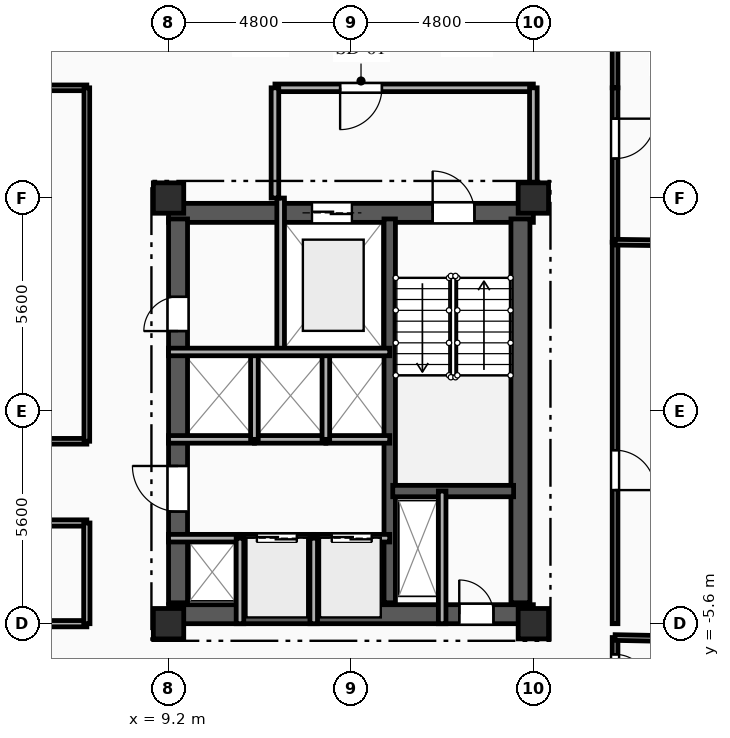
"""IFC4 building model, lengths in metres.
Left out: names, types, materials, properties, quantities, classifications, styles, units other than length and angle.
Written with IfcOpenShell. Run it as: python <this file> out.ifc"""

import sys

from ifc_helpers import new_model, si_unit, direction, frame, frame_2d, origin, origin_2d, place, context, subcontext, project, spatial, rectangle, extrude, element, fill, save


model = new_model("IFC4")
c1 = context("Model", 3, precision=1e-05, world=origin(), true_north=direction((0.0, 1.0)))
c2 = subcontext(c1, "Body", "Model", "MODEL_VIEW")
j1 = project(units=[si_unit("LENGTHUNIT", "METRE"), si_unit("PLANEANGLEUNIT", "RADIAN")], contexts=[c1])
p1 = place(None, origin())
s1 = spatial("IfcSite", under=j1, at=p1, CompositionType="ELEMENT")
p2 = place(p1, origin())
s2 = spatial("IfcBuilding", under=s1, at=p2, CompositionType="ELEMENT")
p3 = place(p2, frame((0.0, 0.0, 206.45)))
s3 = spatial("IfcBuildingStorey", under=s2, at=p3, CompositionType="ELEMENT", Elevation=206.45)
for number, where, z_axis, x_axis in (
    (1, (9.2, -5.6, 0.0), (0.0, 0.0, 1.0), (1.0, 0.0, 0.0)),
    (2, (9.2, 5.6, 0.0), (0.0, 0.0, 1.0), (1.0, 0.0, 0.0)),
    (3, (18.8, -5.6, 0.0), (0.0, 0.0, 1.0), (1.0, 0.0, 0.0)),
    (4, (18.8, 5.6, 0.0), (0.0, 0.0, 1.0), (1.0, 0.0, 0.0)),
):
    element("IfcColumn", number, at=place(p3, frame(where, z_axis=z_axis, x_axis=x_axis)), inside=s3, PredefinedType="COLUMN", context=c2, shape_type="SweptSolid", body=[
        extrude(rectangle(XDim=0.8, YDim=0.8, at=origin_2d()), origin(), (0.0, 0.0, 1.0), 3.35),
    ])
p4 = place(p3, frame((9.2, 5.21, 0.0), z_axis=(0.0, 0.0, 1.0), x_axis=(1.0, 0.0, 0.0)))
e5 = element("IfcWall", 5, at=p4, inside=s3, PredefinedType="SHEAR", context=c2, shape_type="SweptSolid", body=[
    extrude(rectangle(XDim=9.6, YDim=0.5, at=frame_2d((4.8, 0.0))), origin(), (0.0, 0.0, 1.0), 3.04),
])
p5 = place(p4, frame((6.95, 0.0, 0.0)))
e6 = element("IfcOpeningElement", 6, at=p5, cuts=e5, PredefinedType="OPENING", context=c2, shape_type="SweptSolid", body=[
    extrude(rectangle(XDim=1.1, YDim=2.15, at=frame_2d((0.55, 1.075))), frame((0.0, 0.26, 0.0), z_axis=(0.0, -1.0, 0.0), x_axis=(1.0, 0.0, 0.0)), (0.0, 0.0, 1.0), 0.52),
])
p6 = place(p4, frame((3.775, 0.0, 0.0)))
e7 = element("IfcOpeningElement", 7, at=p6, cuts=e5, PredefinedType="OPENING", context=c2, shape_type="SweptSolid", body=[
    extrude(rectangle(XDim=1.05, YDim=2.1, at=frame_2d((0.525, 1.05))), frame((0.0, 0.26, 0.0), z_axis=(0.0, -1.0, 0.0), x_axis=(1.0, 0.0, 0.0)), (0.0, 0.0, 1.0), 0.52),
])
p7 = place(p3, frame((9.2, -5.35, 0.0), z_axis=(0.0, 0.0, 1.0), x_axis=(1.0, 0.0, 0.0)))
e8 = element("IfcWall", 8, at=p7, inside=s3, PredefinedType="SHEAR", context=c2, shape_type="SweptSolid", body=[
    extrude(rectangle(XDim=9.6, YDim=0.5, at=frame_2d((4.8, 0.0))), origin(), (0.0, 0.0, 1.0), 3.04),
])
p8 = place(p7, frame((7.65, 0.0, 0.0)))
e9 = element("IfcOpeningElement", 9, at=p8, cuts=e8, PredefinedType="OPENING", context=c2, shape_type="SweptSolid", body=[
    extrude(rectangle(XDim=0.9, YDim=2.1, at=frame_2d((0.45, 1.05))), frame((0.0, 0.26, 0.0), z_axis=(0.0, -1.0, 0.0), x_axis=(1.0, 0.0, 0.0)), (0.0, 0.0, 1.0), 0.52),
])
p9 = place(p3, frame((9.45, -5.05, 0.0), z_axis=(0.0, 0.0, 1.0), x_axis=(0.0, 1.0, 0.0)))
e10 = element("IfcWall", 10, at=p9, inside=s3, PredefinedType="SHEAR", context=c2, shape_type="SweptSolid", body=[
    extrude(rectangle(XDim=10.1, YDim=0.5, at=frame_2d((5.05, 0.0))), origin(), (0.0, 0.0, 1.0), 3.04),
])
p10 = place(p9, frame((7.15, 0.0, 0.0)))
e11 = element("IfcOpeningElement", 11, at=p10, cuts=e10, PredefinedType="OPENING", context=c2, shape_type="SweptSolid", body=[
    extrude(rectangle(XDim=0.9, YDim=2.1, at=frame_2d((0.45, 1.05))), frame((0.0, 0.26, 0.0), z_axis=(0.0, -1.0, 0.0), x_axis=(1.0, 0.0, 0.0)), (0.0, 0.0, 1.0), 0.52),
])
p11 = place(p9, frame((2.4, 0.0, 0.0)))
e12 = element("IfcOpeningElement", 12, at=p11, cuts=e10, PredefinedType="OPENING", context=c2, shape_type="SweptSolid", body=[
    extrude(rectangle(XDim=1.2, YDim=2.15, at=frame_2d((0.6, 1.075))), frame((0.0, 0.26, 0.0), z_axis=(0.0, -1.0, 0.0), x_axis=(1.0, 0.0, 0.0)), (0.0, 0.0, 1.0), 0.52),
])
p12 = place(p3, frame((18.46, -5.05, 0.0), z_axis=(0.0, 0.0, 1.0), x_axis=(0.0, 1.0, 0.0)))
e13 = element("IfcWall", 13, at=p12, inside=s3, PredefinedType="SHEAR", context=c2, shape_type="SweptSolid", body=[
    extrude(rectangle(XDim=10.1, YDim=0.5, at=frame_2d((5.05, 0.0))), origin(), (0.0, 0.0, 1.0), 3.04),
])
p13 = place(p3, frame((15.02, -5.05, 0.0), z_axis=(0.0, 0.0, 1.0), x_axis=(0.0, 1.0, 0.0)))
e14 = element("IfcWall", 14, at=p13, inside=s3, PredefinedType="SHEAR", context=c2, shape_type="SweptSolid", body=[
    extrude(rectangle(XDim=10.1, YDim=0.3, at=frame_2d((5.05, 0.0))), origin(), (0.0, 0.0, 1.0), 3.04),
])
p14 = place(p3, frame((15.1, -2.11, 0.0), z_axis=(0.0, 0.0, 1.0), x_axis=(1.0, 0.0, 0.0)))
e15 = element("IfcWall", 15, at=p14, inside=s3, PredefinedType="SHEAR", context=c2, shape_type="SweptSolid", body=[
    extrude(rectangle(XDim=3.18, YDim=0.3, at=frame_2d((1.59, 0.0))), origin(), (0.0, 0.0, 1.0), 3.04),
])
p15 = place(p3, frame((16.4, -2.11, 0.0), z_axis=(0.0, 0.0, 1.0), x_axis=(0.0, -1.0, 0.0)))
e16 = element("IfcWall", 16, at=p15, inside=s3, PredefinedType="PARTITIONING", context=c2, shape_type="SweptSolid", body=[
    extrude(rectangle(XDim=3.49, YDim=0.2, at=frame_2d((1.745, 0.0))), origin(), (0.0, 0.0, 1.0), 3.04),
])
p16 = place(p3, frame((12.15, 5.6, 0.0), z_axis=(0.0, 0.0, 1.0), x_axis=(0.0, -1.0, 0.0)))
e17 = element("IfcWall", 17, at=p16, inside=s3, PredefinedType="PARTITIONING", context=c2, shape_type="SweptSolid", body=[
    extrude(rectangle(XDim=4.05, YDim=0.2, at=frame_2d((2.025, 0.0))), origin(), (0.0, 0.0, 1.0), 3.04),
])
p17 = place(p3, frame((18.8, 8.5, 0.0), z_axis=(0.0, 0.0, 1.0), x_axis=(-1.0, 0.0, 0.0)))
e18 = element("IfcWall", 18, at=p17, inside=s3, PredefinedType="PARTITIONING", context=c2, shape_type="SweptSolid", body=[
    extrude(rectangle(XDim=6.8, YDim=0.2, at=frame_2d((3.4, 0.0))), origin(), (0.0, 0.0, 1.0), 3.04),
])
p18 = place(p17, frame((3.985, 0.0, 0.0)))
e19 = element("IfcOpeningElement", 19, at=p18, cuts=e18, PredefinedType="OPENING", context=c2, shape_type="SweptSolid", body=[
    extrude(rectangle(XDim=1.1, YDim=2.15, at=frame_2d((0.55, 1.075))), frame((0.0, 0.11, 0.0), z_axis=(0.0, -1.0, 0.0), x_axis=(1.0, 0.0, 0.0)), (0.0, 0.0, 1.0), 0.22),
])
p19 = place(p3, frame((18.8, 5.6, 0.0), z_axis=(0.0, 0.0, 1.0), x_axis=(0.0, 1.0, 0.0)))
e20 = element("IfcWall", 20, at=p19, inside=s3, PredefinedType="PARTITIONING", context=c2, shape_type="SweptSolid", body=[
    extrude(rectangle(XDim=2.9, YDim=0.2, at=frame_2d((1.45, 0.0))), origin(), (0.0, 0.0, 1.0), 2.665),
])
p20 = place(p3, frame((12.0, 8.5, 0.0), z_axis=(0.0, 0.0, 1.0), x_axis=(0.0, -1.0, 0.0)))
e21 = element("IfcWall", 21, at=p20, inside=s3, PredefinedType="PARTITIONING", context=c2, shape_type="SweptSolid", body=[
    extrude(rectangle(XDim=2.9, YDim=0.2, at=frame_2d((1.45, 0.0))), origin(), (0.0, 0.0, 1.0), 3.04),
])
p21 = place(p3, frame((9.2, -3.35, 0.0), z_axis=(0.0, 0.0, 1.0), x_axis=(1.0, 0.0, 0.0)))
e22 = element("IfcWall", 22, at=p21, inside=s3, PredefinedType="PARTITIONING", context=c2, shape_type="SweptSolid", body=[
    extrude(rectangle(XDim=1.88, YDim=0.2, at=frame_2d((0.94, 0.0))), origin(), (0.0, 0.0, 1.0), 2.755),
])
p22 = place(p3, frame((11.08, -3.35, 0.0), z_axis=(0.0, 0.0, 1.0), x_axis=(1.0, 0.0, 0.0)))
e23 = element("IfcWall", 23, at=p22, inside=s3, PredefinedType="PARTITIONING", context=c2, shape_type="SweptSolid", body=[
    extrude(rectangle(XDim=1.94, YDim=0.2, at=frame_2d((0.97, 0.0))), origin(), (0.0, 0.0, 1.0), 3.04),
])
p23 = place(p22, frame((0.445, 0.0, 0.0)))
e24 = element("IfcOpeningElement", 24, at=p23, cuts=e23, PredefinedType="OPENING", context=c2, shape_type="SweptSolid", body=[
    extrude(rectangle(XDim=1.05, YDim=2.1, at=frame_2d((0.525, 1.05))), frame((0.0, 0.11, 0.0), z_axis=(0.0, -1.0, 0.0), x_axis=(1.0, 0.0, 0.0)), (0.0, 0.0, 1.0), 0.22),
])
p24 = place(p3, frame((13.02, -3.35, 0.0), z_axis=(0.0, 0.0, 1.0), x_axis=(1.0, 0.0, 0.0)))
e25 = element("IfcWall", 25, at=p24, inside=s3, PredefinedType="PARTITIONING", context=c2, shape_type="SweptSolid", body=[
    extrude(rectangle(XDim=2.0, YDim=0.2, at=frame_2d((1.0, 0.0))), origin(), (0.0, 0.0, 1.0), 3.04),
])
p25 = place(p24, frame((0.475, 0.0, 0.0)))
e26 = element("IfcOpeningElement", 26, at=p25, cuts=e25, PredefinedType="OPENING", context=c2, shape_type="SweptSolid", body=[
    extrude(rectangle(XDim=1.05, YDim=2.1, at=frame_2d((0.525, 1.05))), frame((0.0, 0.11, 0.0), z_axis=(0.0, -1.0, 0.0), x_axis=(1.0, 0.0, 0.0)), (0.0, 0.0, 1.0), 0.22),
])
p26 = place(p3, frame((11.46, -0.75, 0.0), z_axis=(0.0, 0.0, 1.0), x_axis=(-1.0, 0.0, 0.0)))
e27 = element("IfcWall", 27, at=p26, inside=s3, PredefinedType="PARTITIONING", context=c2, shape_type="SweptSolid", body=[
    extrude(rectangle(XDim=2.26, YDim=0.2, at=frame_2d((1.13, 0.0))), origin(), (0.0, 0.0, 1.0), 3.04),
])
p27 = place(p3, frame((13.34, -0.75, 0.0), z_axis=(0.0, 0.0, 1.0), x_axis=(-1.0, 0.0, 0.0)))
e28 = element("IfcWall", 28, at=p27, inside=s3, PredefinedType="PARTITIONING", context=c2, shape_type="SweptSolid", body=[
    extrude(rectangle(XDim=1.88, YDim=0.2, at=frame_2d((0.94, 0.0))), origin(), (0.0, 0.0, 1.0), 3.04),
])
p28 = place(p3, frame((15.02, -0.75, 0.0), z_axis=(0.0, 0.0, 1.0), x_axis=(-1.0, 0.0, 0.0)))
e29 = element("IfcWall", 29, at=p28, inside=s3, PredefinedType="PARTITIONING", context=c2, shape_type="SweptSolid", body=[
    extrude(rectangle(XDim=1.68, YDim=0.2, at=frame_2d((0.84, 0.0))), origin(), (0.0, 0.0, 1.0), 3.04),
])
for number, where, z_axis, x_axis in (
    (30, (11.08, -5.6, 0.0), (0.0, 0.0, 1.0), (0.0, 1.0, 0.0)),
    (31, (13.02, -5.6, 0.0), (0.0, 0.0, 1.0), (0.0, 1.0, 0.0)),
):
    element("IfcWall", number, at=place(p3, frame(where, z_axis=z_axis, x_axis=x_axis)), inside=s3, PredefinedType="PARTITIONING", context=c2, shape_type="SweptSolid", body=[
        extrude(rectangle(XDim=2.25, YDim=0.2, at=frame_2d((1.125, 0.0))), origin(), (0.0, 0.0, 1.0), 3.04),
    ])
for number, where, z_axis, x_axis in (
    (32, (11.46, -0.75, 0.0), (0.0, 0.0, 1.0), (0.0, 1.0, 0.0)),
    (33, (13.34, -0.75, 0.0), (0.0, 0.0, 1.0), (0.0, 1.0, 0.0)),
):
    element("IfcWall", number, at=place(p3, frame(where, z_axis=z_axis, x_axis=x_axis)), inside=s3, PredefinedType="PARTITIONING", context=c2, shape_type="SweptSolid", body=[
        extrude(rectangle(XDim=2.3, YDim=0.2, at=frame_2d((1.15, 0.0))), origin(), (0.0, 0.0, 1.0), 3.04),
    ])
p29 = place(p3, frame((20.95, 10.65, 0.0), z_axis=(0.0, 0.0, 1.0), x_axis=(0.0, -1.0, 0.0)))
e34 = element("IfcWall", 34, at=p29, inside=s3, PredefinedType="PARTITIONING", context=c2, shape_type="SweptSolid", body=[
    extrude(rectangle(XDim=2.15, YDim=0.15, at=frame_2d((1.075, 0.0))), origin(), (0.0, 0.0, 1.0), 3.04),
])
p30 = place(p3, frame((7.05, 8.5, 0.0), z_axis=(0.0, 0.0, 1.0), x_axis=(-1.0, 0.0, 0.0)))
e35 = element("IfcWall", 35, at=p30, inside=s3, PredefinedType="PARTITIONING", context=c2, shape_type="SweptSolid", body=[
    extrude(rectangle(XDim=7.05, YDim=0.15, at=frame_2d((3.525, 0.0))), origin(), (0.0, 0.0, 1.0), 3.04),
])
p31 = place(p3, frame((20.95, -5.964, 0.0), z_axis=(0.0, 0.0, 1.0), x_axis=(0.0, -1.0, 0.0)))
e36 = element("IfcWall", 36, at=p31, inside=s3, PredefinedType="PARTITIONING", context=c2, shape_type="SweptSolid", body=[
    extrude(rectangle(XDim=1.786, YDim=0.15, at=frame_2d((0.893, 0.0))), origin(), (0.0, 0.0, 1.0), 3.04),
])
p32 = place(p31, frame((0.443, 0.0, 0.0)))
e37 = element("IfcOpeningElement", 37, at=p32, cuts=e36, PredefinedType="OPENING", context=c2, shape_type="SweptSolid", body=[
    extrude(rectangle(XDim=0.9, YDim=2.1, at=frame_2d((0.45, 1.05))), frame((0.0, 0.085, 0.0), z_axis=(0.0, -1.0, 0.0), x_axis=(1.0, 0.0, 0.0)), (0.0, 0.0, 1.0), 0.17),
])
p33 = place(p3, frame((0.0, -5.6, 0.0), z_axis=(0.0, 0.0, 1.0), x_axis=(1.0, 0.0, 0.0)))
e38 = element("IfcWall", 38, at=p33, inside=s3, PredefinedType="PARTITIONING", context=c2, shape_type="SweptSolid", body=[
    extrude(rectangle(XDim=7.05, YDim=0.165, at=frame_2d((3.525, 0.0))), origin(), (0.0, 0.0, 1.0), 2.525),
])
p34 = place(p3, frame((20.95, 4.438, 0.0), z_axis=(0.0, 0.0, 1.0), x_axis=(0.0, -1.0, 0.0)))
e39 = element("IfcWall", 39, at=p34, inside=s3, PredefinedType="PARTITIONING", context=c2, shape_type="SweptSolid", body=[
    extrude(rectangle(XDim=10.038, YDim=0.15, at=frame_2d((5.019, 0.0))), origin(), (0.0, 0.0, 1.0), 2.695),
])
p35 = place(p34, frame((5.472, 0.0, 0.0)))
e40 = element("IfcOpeningElement", 40, at=p35, cuts=e39, PredefinedType="OPENING", context=c2, shape_type="SweptSolid", body=[
    extrude(rectangle(XDim=1.05, YDim=2.15, at=frame_2d((0.525, 1.075))), frame((0.0, 0.085, 0.0), z_axis=(0.0, -1.0, 0.0), x_axis=(1.0, 0.0, 0.0)), (0.0, 0.0, 1.0), 0.17),
])
p36 = place(p3, frame((20.95, 8.5, 0.0), z_axis=(0.0, 0.0, 1.0), x_axis=(0.0, -1.0, 0.0)))
e41 = element("IfcWall", 41, at=p36, inside=s3, PredefinedType="PARTITIONING", context=c2, shape_type="SweptSolid", body=[
    extrude(rectangle(XDim=4.062, YDim=0.15, at=frame_2d((2.031, 0.0))), origin(), (0.0, 0.0, 1.0), 3.04),
])
p37 = place(p36, frame((0.812, 0.0, 0.0)))
e42 = element("IfcOpeningElement", 42, at=p37, cuts=e41, PredefinedType="OPENING", context=c2, shape_type="SweptSolid", body=[
    extrude(rectangle(XDim=1.05, YDim=2.15, at=frame_2d((0.525, 1.075))), frame((0.0, 0.085, 0.0), z_axis=(0.0, -1.0, 0.0), x_axis=(1.0, 0.0, 0.0)), (0.0, 0.0, 1.0), 0.17),
])
p38 = place(p3, frame((-7.05, -0.8, 0.0), z_axis=(0.0, 0.0, 1.0), x_axis=(1.0, 0.0, 0.0)))
e43 = element("IfcWall", 43, at=p38, inside=s3, PredefinedType="PARTITIONING", context=c2, shape_type="SweptSolid", body=[
    extrude(rectangle(XDim=14.1, YDim=0.15, at=frame_2d((7.05, 0.0))), origin(), (0.0, 0.0, 1.0), 3.04),
])
p39 = place(p38, frame((6.525, 0.0, 0.0)))
e44 = element("IfcOpeningElement", 44, at=p39, cuts=e43, PredefinedType="OPENING", context=c2, shape_type="SweptSolid", body=[
    extrude(rectangle(XDim=1.05, YDim=2.15, at=frame_2d((0.525, 1.075))), frame((0.0, 0.085, 0.0), z_axis=(0.0, -1.0, 0.0), x_axis=(1.0, 0.0, 0.0)), (0.0, 0.0, 1.0), 0.17),
])
p40 = place(p3, frame((7.05, -2.95, 0.0), z_axis=(0.0, 0.0, 1.0), x_axis=(-1.0, 0.0, 0.0)))
e45 = element("IfcWall", 45, at=p40, inside=s3, PredefinedType="PARTITIONING", context=c2, shape_type="SweptSolid", body=[
    extrude(rectangle(XDim=14.1, YDim=0.165, at=frame_2d((7.05, 0.0))), origin(), (0.0, 0.0, 1.0), 3.04),
])
p41 = place(p40, frame((6.475, 0.0, 0.0)))
e46 = element("IfcOpeningElement", 46, at=p41, cuts=e45, PredefinedType="OPENING", context=c2, shape_type="SweptSolid", body=[
    extrude(rectangle(XDim=1.15, YDim=2.15, at=frame_2d((0.575, 1.075))), frame((0.0, 0.093, 0.0), z_axis=(0.0, -1.0, 0.0), x_axis=(1.0, 0.0, 0.0)), (0.0, 0.0, 1.0), 0.185),
])
p42 = place(p3, frame((7.05, -0.8, 0.0), z_axis=(0.0, 0.0, 1.0), x_axis=(0.0, 1.0, 0.0)))
e47 = element("IfcWall", 47, at=p42, inside=s3, PredefinedType="PARTITIONING", context=c2, shape_type="SweptSolid", body=[
    extrude(rectangle(XDim=9.3, YDim=0.15, at=frame_2d((4.65, 0.0))), origin(), (0.0, 0.0, 1.0), 3.04),
])
p43 = place(p3, frame((7.05, -5.6, 0.0), z_axis=(0.0, 0.0, 1.0), x_axis=(0.0, 1.0, 0.0)))
e48 = element("IfcWall", 48, at=p43, inside=s3, PredefinedType="PARTITIONING", context=c2, shape_type="SweptSolid", body=[
    extrude(rectangle(XDim=2.65, YDim=0.165, at=frame_2d((1.325, 0.0))), origin(), (0.0, 0.0, 1.0), 3.04),
])
p44 = place(p3, frame((20.95, -5.964, 0.0), z_axis=(0.0, 0.0, 1.0), x_axis=(0.999809784752, -0.019503700029, 0.0)))
e49 = element("IfcWall", 49, at=p44, inside=s3, PredefinedType="PARTITIONING", context=c2, shape_type="SweptSolid", body=[
    extrude(rectangle(XDim=2.241, YDim=0.15, at=frame_2d((1.12, 0.0))), origin(), (0.0, 0.0, 1.0), 3.04),
])
p45 = place(p3, frame((20.95, 4.438, 0.0), z_axis=(0.0, 0.0, 1.0), x_axis=(0.999913116238, -0.013181804667, 0.0)))
e50 = element("IfcWall", 50, at=p45, inside=s3, PredefinedType="PARTITIONING", context=c2, shape_type="SweptSolid", body=[
    extrude(rectangle(XDim=3.334, YDim=0.15, at=frame_2d((1.667, 0.0))), origin(), (0.0, 0.0, 1.0), 3.04),
])
p46 = place(p3, frame((9.2, 1.55, 0.0), z_axis=(0.0, 0.0, 1.0), x_axis=(1.0, 0.0, 0.0)))
e51 = element("IfcWall", 51, at=p46, inside=s3, PredefinedType="PARTITIONING", context=c2, shape_type="SweptSolid", body=[
    extrude(rectangle(XDim=5.82, YDim=0.2, at=frame_2d((2.91, 0.0))), origin(), (0.0, 0.0, 1.0), 3.04),
])
p47 = place(p5, origin())
e52 = element("IfcDoor", 52, at=p47, inside=s3, OperationType="SINGLE_SWING_LEFT", PredefinedType="DOOR", context=c2, shape_type="SweptSolid", body=[
    extrude(rectangle(XDim=1.1, YDim=2.15, at=frame_2d((0.55, 1.075))), frame((0.0, 0.025, 0.0), z_axis=(0.0, -1.0, 0.0), x_axis=(1.0, 0.0, 0.0)), (0.0, 0.0, 1.0), 0.05),
])
fill(e6, e52)
p48 = place(p6, origin())
e53 = element("IfcDoor", 53, at=p48, inside=s3, OperationType="DOUBLE_DOOR_SLIDING", PredefinedType="DOOR", context=c2, shape_type="SweptSolid", body=[
    extrude(rectangle(XDim=1.05, YDim=2.1, at=frame_2d((0.525, 1.05))), frame((0.0, 0.025, 0.0), z_axis=(0.0, -1.0, 0.0), x_axis=(1.0, 0.0, 0.0)), (0.0, 0.0, 1.0), 0.05),
])
fill(e7, e53)
p49 = place(p8, origin())
e54 = element("IfcDoor", 54, at=p49, inside=s3, OperationType="SINGLE_SWING_LEFT", PredefinedType="DOOR", context=c2, shape_type="SweptSolid", body=[
    extrude(rectangle(XDim=0.9, YDim=2.1, at=frame_2d((0.45, 1.05))), frame((0.0, 0.025, 0.0), z_axis=(0.0, -1.0, 0.0), x_axis=(1.0, 0.0, 0.0)), (0.0, 0.0, 1.0), 0.05),
])
fill(e9, e54)
p50 = place(p18, origin())
e55 = element("IfcDoor", 55, at=p50, inside=s3, OperationType="SINGLE_SWING_RIGHT", PredefinedType="DOOR", context=c2, shape_type="SweptSolid", body=[
    extrude(rectangle(XDim=1.1, YDim=2.15, at=frame_2d((0.55, 1.075))), frame((0.0, 0.025, 0.0), z_axis=(0.0, -1.0, 0.0), x_axis=(1.0, 0.0, 0.0)), (0.0, 0.0, 1.0), 0.05),
])
fill(e19, e55)
p51 = place(p10, origin())
e56 = element("IfcDoor", 56, at=p51, inside=s3, OperationType="SINGLE_SWING_LEFT", PredefinedType="DOOR", context=c2, shape_type="SweptSolid", body=[
    extrude(rectangle(XDim=0.9, YDim=2.1, at=frame_2d((0.45, 1.05))), frame((0.0, 0.025, 0.0), z_axis=(0.0, -1.0, 0.0), x_axis=(1.0, 0.0, 0.0)), (0.0, 0.0, 1.0), 0.05),
])
fill(e11, e56)
p52 = place(p23, origin())
e57 = element("IfcDoor", 57, at=p52, inside=s3, OperationType="DOUBLE_DOOR_SLIDING", PredefinedType="DOOR", context=c2, shape_type="SweptSolid", body=[
    extrude(rectangle(XDim=1.05, YDim=2.1, at=frame_2d((0.525, 1.05))), frame((0.0, 0.025, 0.0), z_axis=(0.0, -1.0, 0.0), x_axis=(1.0, 0.0, 0.0)), (0.0, 0.0, 1.0), 0.05),
])
fill(e24, e57)
p53 = place(p25, origin())
e58 = element("IfcDoor", 58, at=p53, inside=s3, OperationType="DOUBLE_DOOR_SLIDING", PredefinedType="DOOR", context=c2, shape_type="SweptSolid", body=[
    extrude(rectangle(XDim=1.05, YDim=2.1, at=frame_2d((0.525, 1.05))), frame((0.0, 0.025, 0.0), z_axis=(0.0, -1.0, 0.0), x_axis=(1.0, 0.0, 0.0)), (0.0, 0.0, 1.0), 0.05),
])
fill(e26, e58)
p54 = place(p11, origin())
e59 = element("IfcDoor", 59, at=p54, inside=s3, OperationType="SINGLE_SWING_RIGHT", PredefinedType="DOOR", context=c2, shape_type="SweptSolid", body=[
    extrude(rectangle(XDim=1.2, YDim=2.15, at=frame_2d((0.6, 1.075))), frame((0.0, 0.025, 0.0), z_axis=(0.0, -1.0, 0.0), x_axis=(1.0, 0.0, 0.0)), (0.0, 0.0, 1.0), 0.05),
])
fill(e12, e59)
p55 = place(p32, origin())
e60 = element("IfcDoor", 60, at=p55, inside=s3, OperationType="SINGLE_SWING_RIGHT", PredefinedType="DOOR", context=c2, shape_type="SweptSolid", body=[
    extrude(rectangle(XDim=0.9, YDim=2.1, at=frame_2d((0.45, 1.05))), frame((0.0, 0.025, 0.0), z_axis=(0.0, -1.0, 0.0), x_axis=(1.0, 0.0, 0.0)), (0.0, 0.0, 1.0), 0.05),
])
fill(e37, e60)
p56 = place(p35, origin())
e61 = element("IfcDoor", 61, at=p56, inside=s3, OperationType="SINGLE_SWING_RIGHT", PredefinedType="DOOR", context=c2, shape_type="SweptSolid", body=[
    extrude(rectangle(XDim=1.05, YDim=2.15, at=frame_2d((0.525, 1.075))), frame((0.0, 0.025, 0.0), z_axis=(0.0, -1.0, 0.0), x_axis=(1.0, 0.0, 0.0)), (0.0, 0.0, 1.0), 0.05),
])
fill(e40, e61)
p57 = place(p37, origin())
e62 = element("IfcDoor", 62, at=p57, inside=s3, OperationType="SINGLE_SWING_LEFT", PredefinedType="DOOR", context=c2, shape_type="SweptSolid", body=[
    extrude(rectangle(XDim=1.05, YDim=2.15, at=frame_2d((0.525, 1.075))), frame((0.0, 0.025, 0.0), z_axis=(0.0, -1.0, 0.0), x_axis=(1.0, 0.0, 0.0)), (0.0, 0.0, 1.0), 0.05),
])
fill(e42, e62)
save(model, sys.argv[1])
